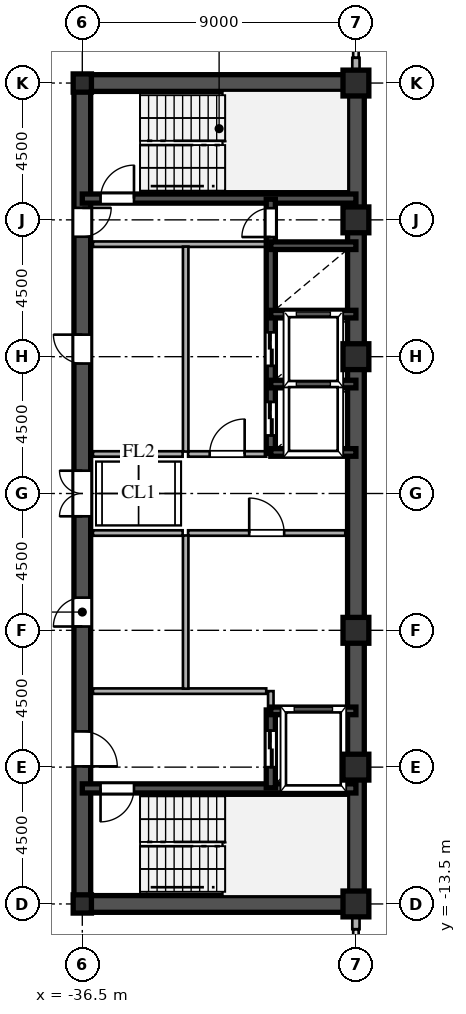
"""IFC4 building model, lengths in metres.
Left out: names, types, materials, properties, quantities, classifications, styles, units other than length and angle.
Written with IfcOpenShell. Run it as: python <this file> out.ifc"""

import sys

from ifc_helpers import new_model, si_unit, direction, frame, frame_2d, origin, origin_2d, place, context, subcontext, project, spatial, rectangle, hollow_rectangle, i_section, extrude, source, transform, mapped, element, fill, save


model = new_model("IFC4")
c1 = context("Model", 3, precision=1e-05, world=origin(), true_north=direction((0.0, 1.0)))
c2 = subcontext(c1, "Body", "Model", "MODEL_VIEW")
j1 = project(units=[si_unit("LENGTHUNIT", "METRE"), si_unit("PLANEANGLEUNIT", "RADIAN")], contexts=[c1])
p1 = place(None, origin())
s1 = spatial("IfcSite", under=j1, at=p1, CompositionType="ELEMENT")
p2 = place(p1, origin())
s2 = spatial("IfcBuilding", under=s1, at=p2, CompositionType="ELEMENT")
p3 = place(p2, frame((0.0, 0.0, 174.3)))
s3 = spatial("IfcBuildingStorey", under=s2, at=p3, CompositionType="ELEMENT", Elevation=174.3)
m1 = source(origin(), c2, "Body", "SweptSolid", [
    extrude(hollow_rectangle(XDim=0.85, YDim=0.85, WallThickness=0.036, at=origin_2d()), origin(), (0.0, 0.0, 1.0), 3.6),
])
for number, where, z_axis, x_axis in (
    (1, (-27.5, -13.5, 0.0), (0.0, 0.0, 1.0), (1.0, 0.0, 0.0)),
    (2, (-27.5, -9.0, 0.0), (0.0, 0.0, 1.0), (1.0, 0.0, 0.0)),
    (3, (-27.5, -4.5, 0.0), (0.0, 0.0, 1.0), (1.0, 0.0, 0.0)),
    (4, (-27.5, 4.5, 0.0), (0.0, 0.0, 1.0), (1.0, 0.0, 0.0)),
    (5, (-27.5, 9.0, 0.0), (0.0, 0.0, 1.0), (1.0, 0.0, 0.0)),
    (6, (-27.5, 13.5, 0.0), (0.0, 0.0, 1.0), (1.0, 0.0, 0.0)),
):
    element("IfcColumn", number, at=place(p3, frame(where, z_axis=z_axis, x_axis=x_axis)), inside=s3, PredefinedType="COLUMN", context=c2, shape_type="MappedRepresentation", body=[
        mapped(m1, transform((0.0, 0.0, 0.0), scale=1.0)),
    ])
m2 = source(origin(), c2, "Body", "SweptSolid", [
    extrude(i_section(OverallWidth=0.6, OverallDepth=0.6, WebThickness=0.025, FlangeThickness=0.04, at=origin_2d()), origin(), (0.0, 0.0, 1.0), 3.6),
])
for number, where, z_axis, x_axis in (
    (7, (-36.5, -13.5, 0.0), (0.0, 0.0, 1.0), (1.0, 0.0, 0.0)),
    (8, (-36.5, 13.5, 0.0), (0.0, 0.0, 1.0), (1.0, 0.0, 0.0)),
):
    element("IfcColumn", number, at=place(p3, frame(where, z_axis=z_axis, x_axis=x_axis)), inside=s3, PredefinedType="COLUMN", context=c2, shape_type="MappedRepresentation", body=[
        mapped(m2, transform((0.0, 0.0, 0.0), scale=1.0)),
    ])
for number, where, z_axis, x_axis in (
    (9, (-27.5, -14.33, 0.0), (0.0, 0.0, 1.0), (0.0, 1.0, 0.0)),
    (10, (-27.5, 13.78, 0.0), (0.0, 0.0, 1.0), (0.0, 1.0, 0.0)),
):
    element("IfcWall", number, at=place(p3, frame(where, z_axis=z_axis, x_axis=x_axis)), inside=s3, PredefinedType="SOLIDWALL", context=c2, shape_type="SweptSolid", body=[
        extrude(rectangle(XDim=0.55, YDim=0.24, at=frame_2d((0.275, 0.0))), origin(), (0.0, 0.0, 1.0), 2.88),
    ])
for number, where, z_axis, x_axis in (
    (11, (-27.5, -13.5, 0.0), (0.0, 0.0, 1.0), (0.0, 1.0, 0.0)),
    (12, (-27.5, 1.3, 0.0), (0.0, 0.0, 1.0), (0.0, 1.0, 0.0)),
):
    element("IfcWall", number, at=place(p3, frame(where, z_axis=z_axis, x_axis=x_axis)), inside=s3, PredefinedType="SHEAR", context=c2, shape_type="SweptSolid", body=[
        extrude(rectangle(XDim=12.2, YDim=0.55, at=frame_2d((6.1, 0.0))), origin(), (0.0, 0.0, 1.0), 3.38),
    ])
p4 = place(p3, frame((-27.5, -1.3, 0.0), z_axis=(0.0, 0.0, 1.0), x_axis=(0.0, 1.0, 0.0)))
e13 = element("IfcWall", 13, at=p4, inside=s3, PredefinedType="SHEAR", context=c2, shape_type="SweptSolid", body=[
    extrude(rectangle(XDim=2.6, YDim=0.55, at=frame_2d((1.3, 0.0))), origin(), (0.0, 0.0, 1.0), 3.38),
])
for number, where, z_axis, x_axis in (
    (14, (-36.5, -13.5, 0.0), (0.0, 0.0, 1.0), (1.0, 0.0, 0.0)),
    (15, (-36.5, 13.5, 0.0), (0.0, 0.0, 1.0), (1.0, 0.0, 0.0)),
):
    element("IfcWall", number, at=place(p3, frame(where, z_axis=z_axis, x_axis=x_axis)), inside=s3, PredefinedType="SHEAR", context=c2, shape_type="SweptSolid", body=[
        extrude(rectangle(XDim=9.0, YDim=0.55, at=frame_2d((4.5, 0.0))), origin(), (0.0, 0.0, 1.0), 3.38),
    ])
p5 = place(p3, frame((-36.5, -13.65, 0.0), z_axis=(0.0, 0.0, 1.0), x_axis=(0.0, 1.0, 0.0)))
e16 = element("IfcWall", 16, at=p5, inside=s3, PredefinedType="SHEAR", context=c2, shape_type="SweptSolid", body=[
    extrude(rectangle(XDim=7.15, YDim=0.55, at=frame_2d((3.575, 0.0))), origin(), (0.0, 0.0, 1.0), 3.38),
])
p6 = place(p5, frame((4.675, 0.0, 0.0)))
e17 = element("IfcOpeningElement", 17, at=p6, cuts=e16, PredefinedType="OPENING", context=c2, shape_type="SweptSolid", body=[
    extrude(rectangle(XDim=1.15, YDim=2.2, at=frame_2d((0.575, 1.1))), frame((0.0, 0.285, 0.0), z_axis=(0.0, -1.0, 0.0), x_axis=(1.0, 0.0, 0.0)), (0.0, 0.0, 1.0), 0.57),
])
p7 = place(p3, frame((-36.5, -1.3, 0.0), z_axis=(0.0, 0.0, 1.0), x_axis=(0.0, 1.0, 0.0)))
e18 = element("IfcWall", 18, at=p7, inside=s3, PredefinedType="SHEAR", context=c2, shape_type="SweptSolid", body=[
    extrude(rectangle(XDim=2.6, YDim=0.55, at=frame_2d((1.3, 0.0))), origin(), (0.0, 0.0, 1.0), 3.38),
])
p8 = place(p7, frame((0.55, 0.0, 0.0)))
e19 = element("IfcOpeningElement", 19, at=p8, cuts=e18, PredefinedType="OPENING", context=c2, shape_type="SweptSolid", body=[
    extrude(rectangle(XDim=1.5, YDim=2.3, at=frame_2d((0.75, 1.15))), frame((0.0, 0.285, 0.0), z_axis=(0.0, -1.0, 0.0), x_axis=(1.0, 0.0, 0.0)), (0.0, 0.0, 1.0), 0.57),
])
p9 = place(p3, frame((-36.5, 8.2, 0.0), z_axis=(0.0, 0.0, 1.0), x_axis=(0.0, 1.0, 0.0)))
e20 = element("IfcWall", 20, at=p9, inside=s3, PredefinedType="SHEAR", context=c2, shape_type="SweptSolid", body=[
    extrude(rectangle(XDim=5.45, YDim=0.55, at=frame_2d((2.725, 0.0))), origin(), (0.0, 0.0, 1.0), 3.38),
])
p10 = place(p9, frame((0.245, 0.0, 0.0)))
e21 = element("IfcOpeningElement", 21, at=p10, cuts=e20, PredefinedType="OPENING", context=c2, shape_type="SweptSolid", body=[
    extrude(rectangle(XDim=0.95, YDim=2.15, at=frame_2d((0.475, 1.075))), frame((0.0, 0.285, 0.0), z_axis=(0.0, -1.0, 0.0), x_axis=(1.0, 0.0, 0.0)), (0.0, 0.0, 1.0), 0.57),
])
p11 = place(p3, frame((-36.5, -6.5, 0.0), z_axis=(0.0, 0.0, 1.0), x_axis=(0.0, 1.0, 0.0)))
e22 = element("IfcWall", 22, at=p11, inside=s3, PredefinedType="SHEAR", context=c2, shape_type="SweptSolid", body=[
    extrude(rectangle(XDim=5.2, YDim=0.55, at=frame_2d((2.6, 0.0))), origin(), (0.0, 0.0, 1.0), 3.38),
])
p12 = place(p11, frame((2.125, 0.0, 0.0)))
e23 = element("IfcOpeningElement", 23, at=p12, cuts=e22, PredefinedType="OPENING", context=c2, shape_type="SweptSolid", body=[
    extrude(rectangle(XDim=0.95, YDim=2.15, at=frame_2d((0.475, 1.075))), frame((0.0, 0.285, 0.0), z_axis=(0.0, -1.0, 0.0), x_axis=(1.0, 0.0, 0.0)), (0.0, 0.0, 1.0), 0.57),
])
p13 = place(p3, frame((-36.5, 1.3, 0.0), z_axis=(0.0, 0.0, 1.0), x_axis=(0.0, 1.0, 0.0)))
e24 = element("IfcWall", 24, at=p13, inside=s3, PredefinedType="SHEAR", context=c2, shape_type="SweptSolid", body=[
    extrude(rectangle(XDim=6.9, YDim=0.55, at=frame_2d((3.45, 0.0))), origin(), (0.0, 0.0, 1.0), 3.38),
])
p14 = place(p13, frame((2.975, 0.0, 0.0)))
e25 = element("IfcOpeningElement", 25, at=p14, cuts=e24, PredefinedType="OPENING", context=c2, shape_type="SweptSolid", body=[
    extrude(rectangle(XDim=0.95, YDim=2.15, at=frame_2d((0.475, 1.075))), frame((0.0, 0.285, 0.0), z_axis=(0.0, -1.0, 0.0), x_axis=(1.0, 0.0, 0.0)), (0.0, 0.0, 1.0), 0.57),
])
p15 = place(p3, frame((-36.5, -9.7, 0.0), z_axis=(0.0, 0.0, 1.0), x_axis=(1.0, 0.0, 0.0)))
e26 = element("IfcWall", 26, at=p15, inside=s3, PredefinedType="SHEAR", context=c2, shape_type="SweptSolid", body=[
    extrude(rectangle(XDim=9.0, YDim=0.3, at=frame_2d((4.5, 0.0))), origin(), (0.0, 0.0, 1.0), 3.38),
])
p16 = place(p15, frame((0.6, 0.0, 0.0)))
e27 = element("IfcOpeningElement", 27, at=p16, cuts=e26, PredefinedType="OPENING", context=c2, shape_type="SweptSolid", body=[
    extrude(rectangle(XDim=1.1, YDim=2.2, at=frame_2d((0.55, 1.1))), frame((0.0, 0.16, 0.0), z_axis=(0.0, -1.0, 0.0), x_axis=(1.0, 0.0, 0.0)), (0.0, 0.0, 1.0), 0.32),
])
p17 = place(p3, frame((-36.5, 9.7, 0.0), z_axis=(0.0, 0.0, 1.0), x_axis=(1.0, 0.0, 0.0)))
e28 = element("IfcWall", 28, at=p17, inside=s3, PredefinedType="SHEAR", context=c2, shape_type="SweptSolid", body=[
    extrude(rectangle(XDim=9.0, YDim=0.3, at=frame_2d((4.5, 0.0))), origin(), (0.0, 0.0, 1.0), 3.38),
])
p18 = place(p17, frame((0.6, 0.0, 0.0)))
e29 = element("IfcOpeningElement", 29, at=p18, cuts=e28, PredefinedType="OPENING", context=c2, shape_type="SweptSolid", body=[
    extrude(rectangle(XDim=1.1, YDim=2.2, at=frame_2d((0.55, 1.1))), frame((0.0, 0.16, 0.0), z_axis=(0.0, -1.0, 0.0), x_axis=(1.0, 0.0, 0.0)), (0.0, 0.0, 1.0), 0.32),
])
for number, where, z_axis, x_axis in (
    (30, (-30.3, -7.15, 0.0), (0.0, 0.0, 1.0), (1.0, 0.0, 0.0)),
    (31, (-30.3, 1.35, 0.0), (0.0, 0.0, 1.0), (1.0, 0.0, 0.0)),
    (32, (-30.3, 3.6, 0.0), (0.0, 0.0, 1.0), (1.0, 0.0, 0.0)),
    (33, (-30.3, 5.9, 0.0), (0.0, 0.0, 1.0), (1.0, 0.0, 0.0)),
    (34, (-30.3, 8.15, 0.0), (0.0, 0.0, 1.0), (1.0, 0.0, 0.0)),
):
    element("IfcWall", number, at=place(p3, frame(where, z_axis=z_axis, x_axis=x_axis)), inside=s3, PredefinedType="SHEAR", context=c2, shape_type="SweptSolid", body=[
        extrude(rectangle(XDim=2.8, YDim=0.25, at=frame_2d((1.4, 0.0))), origin(), (0.0, 0.0, 1.0), 3.38),
    ])
p19 = place(p3, frame((-30.3, -9.68, 0.0), z_axis=(0.0, 0.0, 1.0), x_axis=(0.0, 1.0, 0.0)))
e35 = element("IfcWall", 35, at=p19, inside=s3, PredefinedType="SHEAR", context=c2, shape_type="SweptSolid", body=[
    extrude(rectangle(XDim=2.56, YDim=0.3, at=frame_2d((1.28, 0.0))), origin(), (0.0, 0.0, 1.0), 3.38),
])
p20 = place(p19, frame((0.68, 0.0, 0.0)))
e36 = element("IfcOpeningElement", 36, at=p20, cuts=e35, PredefinedType="OPENING", context=c2, shape_type="SweptSolid", body=[
    extrude(rectangle(XDim=1.2, YDim=2.25, at=frame_2d((0.6, 1.125))), frame((0.0, 0.16, 0.0), z_axis=(0.0, -1.0, 0.0), x_axis=(1.0, 0.0, 0.0)), (0.0, 0.0, 1.0), 0.32),
])
p21 = place(p3, frame((-30.3, 1.32, 0.0), z_axis=(0.0, 0.0, 1.0), x_axis=(0.0, 1.0, 0.0)))
e37 = element("IfcWall", 37, at=p21, inside=s3, PredefinedType="SHEAR", context=c2, shape_type="SweptSolid", body=[
    extrude(rectangle(XDim=2.28, YDim=0.3, at=frame_2d((1.14, 0.0))), origin(), (0.0, 0.0, 1.0), 3.38),
])
p22 = place(p21, frame((0.59, 0.0, 0.0)))
e38 = element("IfcOpeningElement", 38, at=p22, cuts=e37, PredefinedType="OPENING", context=c2, shape_type="SweptSolid", body=[
    extrude(rectangle(XDim=1.1, YDim=2.2, at=frame_2d((0.55, 1.1))), frame((0.0, 0.16, 0.0), z_axis=(0.0, -1.0, 0.0), x_axis=(1.0, 0.0, 0.0)), (0.0, 0.0, 1.0), 0.32),
])
p23 = place(p3, frame((-30.3, 3.6, 0.0), z_axis=(0.0, 0.0, 1.0), x_axis=(0.0, 1.0, 0.0)))
e39 = element("IfcWall", 39, at=p23, inside=s3, PredefinedType="SHEAR", context=c2, shape_type="SweptSolid", body=[
    extrude(rectangle(XDim=2.3, YDim=0.3, at=frame_2d((1.15, 0.0))), origin(), (0.0, 0.0, 1.0), 3.38),
])
p24 = place(p23, frame((0.6, 0.0, 0.0)))
e40 = element("IfcOpeningElement", 40, at=p24, cuts=e39, PredefinedType="OPENING", context=c2, shape_type="SweptSolid", body=[
    extrude(rectangle(XDim=1.1, YDim=2.2, at=frame_2d((0.55, 1.1))), frame((0.0, 0.16, 0.0), z_axis=(0.0, -1.0, 0.0), x_axis=(1.0, 0.0, 0.0)), (0.0, 0.0, 1.0), 0.32),
])
p25 = place(p3, frame((-30.3, 5.9, 0.0), z_axis=(0.0, 0.0, 1.0), x_axis=(0.0, 1.0, 0.0)))
e41 = element("IfcWall", 41, at=p25, inside=s3, PredefinedType="SHEAR", context=c2, shape_type="SweptSolid", body=[
    extrude(rectangle(XDim=2.25, YDim=0.3, at=frame_2d((1.125, 0.0))), origin(), (0.0, 0.0, 1.0), 3.38),
])
p26 = place(p3, frame((-30.3, 8.15, 0.0), z_axis=(0.0, 0.0, 1.0), x_axis=(0.0, 1.0, 0.0)))
e42 = element("IfcWall", 42, at=p26, inside=s3, PredefinedType="SHEAR", context=c2, shape_type="SweptSolid", body=[
    extrude(rectangle(XDim=1.53, YDim=0.3, at=frame_2d((0.765, 0.0))), origin(), (0.0, 0.0, 1.0), 3.38),
])
p27 = place(p26, frame((0.285, 0.0, 0.0)))
e43 = element("IfcOpeningElement", 43, at=p27, cuts=e42, PredefinedType="OPENING", context=c2, shape_type="SweptSolid", body=[
    extrude(rectangle(XDim=0.95, YDim=2.15, at=frame_2d((0.475, 1.075))), frame((0.0, 0.16, 0.0), z_axis=(0.0, -1.0, 0.0), x_axis=(1.0, 0.0, 0.0)), (0.0, 0.0, 1.0), 0.32),
])
p28 = place(p3, frame((-36.15, -6.5, 0.0), z_axis=(0.0, 0.0, 1.0), x_axis=(1.0, 0.0, 0.0)))
e44 = element("IfcWall", 44, at=p28, inside=s3, PredefinedType="PARTITIONING", context=c2, shape_type="SweptSolid", body=[
    extrude(rectangle(XDim=5.7, YDim=0.18, at=frame_2d((2.85, 0.0))), origin(), (0.0, 0.0, 1.0), 3.38),
])
p29 = place(p3, frame((-30.3, -7.12, 0.0), z_axis=(0.0, 0.0, 1.0), x_axis=(0.0, 1.0, 0.0)))
e45 = element("IfcWall", 45, at=p29, inside=s3, PredefinedType="PARTITIONING", context=c2, shape_type="SweptSolid", body=[
    extrude(rectangle(XDim=0.62, YDim=0.18, at=frame_2d((0.31, 0.0))), origin(), (0.0, 0.0, 1.0), 3.38),
])
p30 = place(p3, frame((-36.15, 8.2, 0.0), z_axis=(0.0, 0.0, 1.0), x_axis=(1.0, 0.0, 0.0)))
e46 = element("IfcWall", 46, at=p30, inside=s3, PredefinedType="PARTITIONING", context=c2, shape_type="SweptSolid", body=[
    extrude(rectangle(XDim=5.7, YDim=0.18, at=frame_2d((2.85, 0.0))), origin(), (0.0, 0.0, 1.0), 3.38),
])
p31 = place(p3, frame((-33.1, -6.42, 0.0), z_axis=(0.0, 0.0, 1.0), x_axis=(0.0, 1.0, 0.0)))
e47 = element("IfcWall", 47, at=p31, inside=s3, PredefinedType="PARTITIONING", context=c2, shape_type="SweptSolid", body=[
    extrude(rectangle(XDim=5.04, YDim=0.18, at=frame_2d((2.52, 0.0))), origin(), (0.0, 0.0, 1.0), 3.38),
])
p32 = place(p3, frame((-33.1, 1.38, 0.0), z_axis=(0.0, 0.0, 1.0), x_axis=(0.0, 1.0, 0.0)))
e48 = element("IfcWall", 48, at=p32, inside=s3, PredefinedType="PARTITIONING", context=c2, shape_type="SweptSolid", body=[
    extrude(rectangle(XDim=6.74, YDim=0.18, at=frame_2d((3.37, 0.0))), origin(), (0.0, 0.0, 1.0), 3.38),
])
p33 = place(p3, frame((-33.02, -1.3, 0.0), z_axis=(0.0, 0.0, 1.0), x_axis=(1.0, 0.0, 0.0)))
e49 = element("IfcWall", 49, at=p33, inside=s3, PredefinedType="PARTITIONING", context=c2, shape_type="SweptSolid", body=[
    extrude(rectangle(XDim=5.17, YDim=0.18, at=frame_2d((2.585, 0.0))), origin(), (0.0, 0.0, 1.0), 3.38),
])
p34 = place(p33, frame((2.01, 0.0, 0.0)))
e50 = element("IfcOpeningElement", 50, at=p34, cuts=e49, PredefinedType="OPENING", context=c2, shape_type="SweptSolid", body=[
    extrude(rectangle(XDim=1.15, YDim=2.2, at=frame_2d((0.575, 1.1))), frame((0.0, 0.1, 0.0), z_axis=(0.0, -1.0, 0.0), x_axis=(1.0, 0.0, 0.0)), (0.0, 0.0, 1.0), 0.2),
])
p35 = place(p3, frame((-33.02, 1.3, 0.0), z_axis=(0.0, 0.0, 1.0), x_axis=(1.0, 0.0, 0.0)))
e51 = element("IfcWall", 51, at=p35, inside=s3, PredefinedType="PARTITIONING", context=c2, shape_type="SweptSolid", body=[
    extrude(rectangle(XDim=2.57, YDim=0.18, at=frame_2d((1.285, 0.0))), origin(), (0.0, 0.0, 1.0), 3.38),
])
p36 = place(p35, frame((0.71, 0.0, 0.0)))
e52 = element("IfcOpeningElement", 52, at=p36, cuts=e51, PredefinedType="OPENING", context=c2, shape_type="SweptSolid", body=[
    extrude(rectangle(XDim=1.15, YDim=2.2, at=frame_2d((0.575, 1.1))), frame((0.0, 0.1, 0.0), z_axis=(0.0, -1.0, 0.0), x_axis=(1.0, 0.0, 0.0)), (0.0, 0.0, 1.0), 0.2),
])
for number, where, z_axis, x_axis in (
    (53, (-36.15, -1.3, 0.0), (0.0, 0.0, 1.0), (1.0, 0.0, 0.0)),
    (54, (-36.15, 1.3, 0.0), (0.0, 0.0, 1.0), (1.0, 0.0, 0.0)),
):
    element("IfcWall", number, at=place(p3, frame(where, z_axis=z_axis, x_axis=x_axis)), inside=s3, PredefinedType="PARTITIONING", context=c2, shape_type="SweptSolid", body=[
        extrude(rectangle(XDim=2.95, YDim=0.18, at=frame_2d((1.475, 0.0))), origin(), (0.0, 0.0, 1.0), 3.38),
    ])
m3 = source(origin(), c2, "Body", "SweptSolid", [
    extrude(rectangle(XDim=1.15, YDim=2.2, at=frame_2d((0.575, 1.1))), frame((0.0, 0.025, 0.0), z_axis=(0.0, -1.0, 0.0), x_axis=(1.0, 0.0, 0.0)), (0.0, 0.0, 1.0), 0.05),
])
p37 = place(p6, frame((1.15, 0.0, 0.0), z_axis=(0.0, 0.0, 1.0), x_axis=(-1.0, 0.0, 0.0)))
e55 = element("IfcDoor", 55, at=p37, inside=s3, OperationType="SINGLE_SWING_LEFT", PredefinedType="DOOR", context=c2, shape_type="MappedRepresentation", body=[
    mapped(m3, transform((0.0, 0.0, 0.0), scale=1.0)),
])
fill(e17, e55)
m4 = source(origin(), c2, "Body", "SweptSolid", [
    extrude(rectangle(XDim=1.5, YDim=2.3, at=frame_2d((0.75, 1.15))), frame((0.0, 0.025, 0.0), z_axis=(0.0, -1.0, 0.0), x_axis=(1.0, 0.0, 0.0)), (0.0, 0.0, 1.0), 0.05),
])
p38 = place(p8, origin())
e56 = element("IfcDoor", 56, at=p38, inside=s3, OperationType="DOUBLE_SWING_LEFT", PredefinedType="DOOR", context=c2, shape_type="MappedRepresentation", body=[
    mapped(m4, transform((0.0, 0.0, 0.0), scale=1.0)),
])
fill(e19, e56)
m5 = source(origin(), c2, "Body", "SweptSolid", [
    extrude(rectangle(XDim=0.95, YDim=2.15, at=frame_2d((0.475, 1.075))), frame((0.0, 0.025, 0.0), z_axis=(0.0, -1.0, 0.0), x_axis=(1.0, 0.0, 0.0)), (0.0, 0.0, 1.0), 0.05),
])
p39 = place(p10, frame((0.95, 0.0, 0.0), z_axis=(0.0, 0.0, 1.0), x_axis=(-1.0, 0.0, 0.0)))
e57 = element("IfcDoor", 57, at=p39, inside=s3, OperationType="SINGLE_SWING_RIGHT", PredefinedType="DOOR", context=c2, shape_type="MappedRepresentation", body=[
    mapped(m5, transform((0.0, 0.0, 0.0), scale=1.0)),
])
fill(e21, e57)
p40 = place(p12, origin())
e58 = element("IfcDoor", 58, at=p40, inside=s3, OperationType="SINGLE_SWING_LEFT", PredefinedType="DOOR", context=c2, shape_type="MappedRepresentation", body=[
    mapped(m5, transform((0.0, 0.0, 0.0), scale=1.0)),
])
fill(e23, e58)
p41 = place(p14, origin())
e59 = element("IfcDoor", 59, at=p41, inside=s3, OperationType="SINGLE_SWING_RIGHT", PredefinedType="DOOR", context=c2, shape_type="MappedRepresentation", body=[
    mapped(m5, transform((0.0, 0.0, 0.0), scale=1.0)),
])
fill(e25, e59)
m6 = source(origin(), c2, "Body", "SweptSolid", [
    extrude(rectangle(XDim=1.1, YDim=2.2, at=frame_2d((0.55, 1.1))), frame((0.0, 0.025, 0.0), z_axis=(0.0, -1.0, 0.0), x_axis=(1.0, 0.0, 0.0)), (0.0, 0.0, 1.0), 0.05),
])
p42 = place(p16, frame((1.1, 0.0, 0.0), z_axis=(0.0, 0.0, 1.0), x_axis=(-1.0, 0.0, 0.0)))
e60 = element("IfcDoor", 60, at=p42, inside=s3, OperationType="SINGLE_SWING_LEFT", PredefinedType="DOOR", context=c2, shape_type="MappedRepresentation", body=[
    mapped(m6, transform((0.0, 0.0, 0.0), scale=1.0)),
])
fill(e27, e60)
p43 = place(p18, origin())
e61 = element("IfcDoor", 61, at=p43, inside=s3, OperationType="SINGLE_SWING_RIGHT", PredefinedType="DOOR", context=c2, shape_type="MappedRepresentation", body=[
    mapped(m6, transform((0.0, 0.0, 0.0), scale=1.0)),
])
fill(e29, e61)
m7 = source(origin(), c2, "Body", "SweptSolid", [
    extrude(rectangle(XDim=1.2, YDim=2.25, at=frame_2d((0.6, 1.125))), frame((0.0, 0.025, 0.0), z_axis=(0.0, -1.0, 0.0), x_axis=(1.0, 0.0, 0.0)), (0.0, 0.0, 1.0), 0.05),
])
p44 = place(p20, origin())
e62 = element("IfcDoor", 62, at=p44, inside=s3, OperationType="DOUBLE_DOOR_SLIDING", PredefinedType="DOOR", context=c2, shape_type="MappedRepresentation", body=[
    mapped(m7, transform((0.0, 0.0, 0.0), scale=1.0)),
])
fill(e36, e62)
m8 = source(origin(), c2, "Body", "SweptSolid", [
    extrude(rectangle(XDim=1.1, YDim=2.2, at=frame_2d((0.55, 1.1))), frame((0.0, 0.025, 0.0), z_axis=(0.0, -1.0, 0.0), x_axis=(1.0, 0.0, 0.0)), (0.0, 0.0, 1.0), 0.05),
])
p45 = place(p22, origin())
e63 = element("IfcDoor", 63, at=p45, inside=s3, OperationType="DOUBLE_DOOR_SLIDING", PredefinedType="DOOR", context=c2, shape_type="MappedRepresentation", body=[
    mapped(m8, transform((0.0, 0.0, 0.0), scale=1.0)),
])
fill(e38, e63)
p46 = place(p24, origin())
e64 = element("IfcDoor", 64, at=p46, inside=s3, OperationType="DOUBLE_DOOR_SLIDING", PredefinedType="DOOR", context=c2, shape_type="MappedRepresentation", body=[
    mapped(m8, transform((0.0, 0.0, 0.0), scale=1.0)),
])
fill(e40, e64)
p47 = place(p27, origin())
e65 = element("IfcDoor", 65, at=p47, inside=s3, OperationType="SINGLE_SWING_LEFT", PredefinedType="DOOR", context=c2, shape_type="MappedRepresentation", body=[
    mapped(m5, transform((0.0, 0.0, 0.0), scale=1.0)),
])
fill(e43, e65)
p48 = place(p34, origin())
e66 = element("IfcDoor", 66, at=p48, inside=s3, OperationType="SINGLE_SWING_LEFT", PredefinedType="DOOR", context=c2, shape_type="MappedRepresentation", body=[
    mapped(m3, transform((0.0, 0.0, 0.0), scale=1.0)),
])
fill(e50, e66)
p49 = place(p36, origin())
e67 = element("IfcDoor", 67, at=p49, inside=s3, OperationType="SINGLE_SWING_RIGHT", PredefinedType="DOOR", context=c2, shape_type="MappedRepresentation", body=[
    mapped(m3, transform((0.0, 0.0, 0.0), scale=1.0)),
])
fill(e52, e67)
save(model, sys.argv[1])
